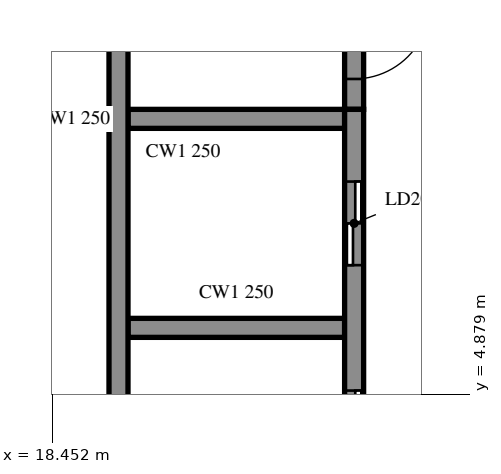
"""IFC4 building model, lengths in metres.
Left out: names, types, materials, properties, quantities, classifications, styles, units other than length and angle.
Written with IfcOpenShell. Run it as: python <this file> out.ifc"""

import sys

from ifc_helpers import new_model, si_unit, direction, frame, frame_2d, origin, place, context, subcontext, project, spatial, rectangle, extrude, element, fill, save


model = new_model("IFC4")
c1 = context("Model", 3, precision=1e-05, world=origin(), true_north=direction((0.0, 1.0)))
c2 = subcontext(c1, "Body", "Model", "MODEL_VIEW")
j1 = project(units=[si_unit("LENGTHUNIT", "METRE"), si_unit("PLANEANGLEUNIT", "RADIAN")], contexts=[c1])
p1 = place(None, origin())
s1 = spatial("IfcSite", under=j1, at=p1, CompositionType="ELEMENT")
p2 = place(p1, origin())
s2 = spatial("IfcBuilding", under=s1, at=p2, CompositionType="ELEMENT")
p3 = place(p2, frame((0.0, 0.0, 224.3)))
s3 = spatial("IfcBuildingStorey", under=s2, at=p3, CompositionType="ELEMENT", Elevation=224.3)
p4 = place(p3, frame((19.325, 15.125, 0.0), z_axis=(0.0, 0.0, 1.0), x_axis=(0.0, -1.0, 0.0)))
e1 = element("IfcWall", 1, at=p4, inside=s3, PredefinedType="SOLIDWALL", context=c2, shape_type="SweptSolid", body=[
    extrude(rectangle(XDim=24.25, YDim=0.25, at=frame_2d((12.125, 0.0))), origin(), (0.0, 0.0, 1.0), 3.96),
])
p5 = place(p3, frame((22.425, -8.875, 0.0), z_axis=(0.0, 0.0, 1.0), x_axis=(0.0, 1.0, 0.0)))
e2 = element("IfcWall", 2, at=p5, inside=s3, PredefinedType="SOLIDWALL", context=c2, shape_type="SweptSolid", body=[
    extrude(rectangle(XDim=17.5, YDim=0.25, at=frame_2d((8.75, 0.0))), origin(), (0.0, 0.0, 1.0), 3.96),
])
p6 = place(p5, frame((7.2, 0.0, 0.0)))
e3 = element("IfcOpeningElement", 3, at=p6, cuts=e2, PredefinedType="OPENING", context=c2, shape_type="SweptSolid", body=[
    extrude(rectangle(XDim=1.1, YDim=2.1, at=frame_2d((0.55, 1.05))), frame((0.0, 0.135, 0.0), z_axis=(0.0, -1.0, 0.0), x_axis=(1.0, 0.0, 0.0)), (0.0, 0.0, 1.0), 0.27),
])
p7 = place(p5, frame((9.95, 0.0, 0.0)))
e4 = element("IfcOpeningElement", 4, at=p7, cuts=e2, PredefinedType="OPENING", context=c2, shape_type="SweptSolid", body=[
    extrude(rectangle(XDim=1.1, YDim=2.1, at=frame_2d((0.55, 1.05))), frame((0.0, 0.135, 0.0), z_axis=(0.0, -1.0, 0.0), x_axis=(1.0, 0.0, 0.0)), (0.0, 0.0, 1.0), 0.27),
])
p8 = place(p5, frame((12.7, 0.0, 0.0)))
e5 = element("IfcOpeningElement", 5, at=p8, cuts=e2, PredefinedType="OPENING", context=c2, shape_type="SweptSolid", body=[
    extrude(rectangle(XDim=1.1, YDim=2.1, at=frame_2d((0.55, 1.05))), frame((0.0, 0.135, 0.0), z_axis=(0.0, -1.0, 0.0), x_axis=(1.0, 0.0, 0.0)), (0.0, 0.0, 1.0), 0.27),
])
p9 = place(p5, frame((15.45, 0.0, 0.0)))
e6 = element("IfcOpeningElement", 6, at=p9, cuts=e2, PredefinedType="OPENING", context=c2, shape_type="SweptSolid", body=[
    extrude(rectangle(XDim=1.1, YDim=2.1, at=frame_2d((0.55, 1.05))), frame((0.0, 0.135, 0.0), z_axis=(0.0, -1.0, 0.0), x_axis=(1.0, 0.0, 0.0)), (0.0, 0.0, 1.0), 0.27),
])
p10 = place(p5, frame((1.012, 0.0, 0.0)))
e7 = element("IfcOpeningElement", 7, at=p10, cuts=e2, PredefinedType="OPENING", context=c2, shape_type="SweptSolid", body=[
    extrude(rectangle(XDim=0.9, YDim=2.1, at=frame_2d((0.45, 1.05))), frame((0.0, 0.135, 0.0), z_axis=(0.0, -1.0, 0.0), x_axis=(1.0, 0.0, 0.0)), (0.0, 0.0, 1.0), 0.27),
])
p11 = place(p5, frame((4.087, 0.0, 0.0)))
e8 = element("IfcOpeningElement", 8, at=p11, cuts=e2, PredefinedType="OPENING", context=c2, shape_type="SweptSolid", body=[
    extrude(rectangle(XDim=0.9, YDim=2.1, at=frame_2d((0.45, 1.05))), frame((0.0, 0.135, 0.0), z_axis=(0.0, -1.0, 0.0), x_axis=(1.0, 0.0, 0.0)), (0.0, 0.0, 1.0), 0.27),
])
p12 = place(p3, frame((22.425, 14.875, 0.0), z_axis=(0.0, 0.0, 1.0), x_axis=(0.0, -1.0, 0.0)))
e9 = element("IfcWall", 9, at=p12, inside=s3, PredefinedType="SOLIDWALL", context=c2, shape_type="SweptSolid", body=[
    extrude(rectangle(XDim=6.25, YDim=0.25, at=frame_2d((3.125, 0.0))), origin(), (0.0, 0.0, 1.0), 3.96),
])
p13 = place(p12, frame((4.85, 0.0, 0.0)))
e10 = element("IfcOpeningElement", 10, at=p13, cuts=e9, PredefinedType="OPENING", context=c2, shape_type="SweptSolid", body=[
    extrude(rectangle(XDim=1.0, YDim=2.1, at=frame_2d((0.5, 1.05))), frame((0.0, 0.135, 0.0), z_axis=(0.0, -1.0, 0.0), x_axis=(1.0, 0.0, 0.0)), (0.0, 0.0, 1.0), 0.27),
])
for number, where, z_axis, x_axis in (
    (11, (19.45, 5.75, 0.0), (0.0, 0.0, 1.0), (1.0, 0.0, 0.0)),
    (12, (19.45, 8.5, 0.0), (0.0, 0.0, 1.0), (1.0, 0.0, 0.0)),
):
    element("IfcWall", number, at=place(p3, frame(where, z_axis=z_axis, x_axis=x_axis)), inside=s3, PredefinedType="SOLIDWALL", context=c2, shape_type="SweptSolid", body=[
        extrude(rectangle(XDim=2.85, YDim=0.25, at=frame_2d((1.425, 0.0))), origin(), (0.0, 0.0, 1.0), 3.96),
    ])
p14 = place(p8, origin())
e13 = element("IfcDoor", 13, at=p14, inside=s3, OperationType="DOUBLE_DOOR_SLIDING", PredefinedType="DOOR", context=c2, shape_type="SweptSolid", body=[
    extrude(rectangle(XDim=1.1, YDim=2.1, at=frame_2d((0.55, 1.05))), frame((0.0, 0.025, 0.0), z_axis=(0.0, -1.0, 0.0), x_axis=(1.0, 0.0, 0.0)), (0.0, 0.0, 1.0), 0.05),
])
fill(e5, e13)
p15 = place(p9, origin())
e14 = element("IfcDoor", 14, at=p15, inside=s3, OperationType="DOUBLE_DOOR_SLIDING", PredefinedType="DOOR", context=c2, shape_type="SweptSolid", body=[
    extrude(rectangle(XDim=1.1, YDim=2.1, at=frame_2d((0.55, 1.05))), frame((0.0, 0.025, 0.0), z_axis=(0.0, -1.0, 0.0), x_axis=(1.0, 0.0, 0.0)), (0.0, 0.0, 1.0), 0.05),
])
fill(e6, e14)
p16 = place(p13, origin())
e15 = element("IfcDoor", 15, at=p16, inside=s3, OperationType="SINGLE_SWING_LEFT", PredefinedType="DOOR", context=c2, shape_type="SweptSolid", body=[
    extrude(rectangle(XDim=1.0, YDim=2.1, at=frame_2d((0.5, 1.05))), frame((0.0, 0.025, 0.0), z_axis=(0.0, -1.0, 0.0), x_axis=(1.0, 0.0, 0.0)), (0.0, 0.0, 1.0), 0.05),
])
fill(e10, e15)
save(model, sys.argv[1])
